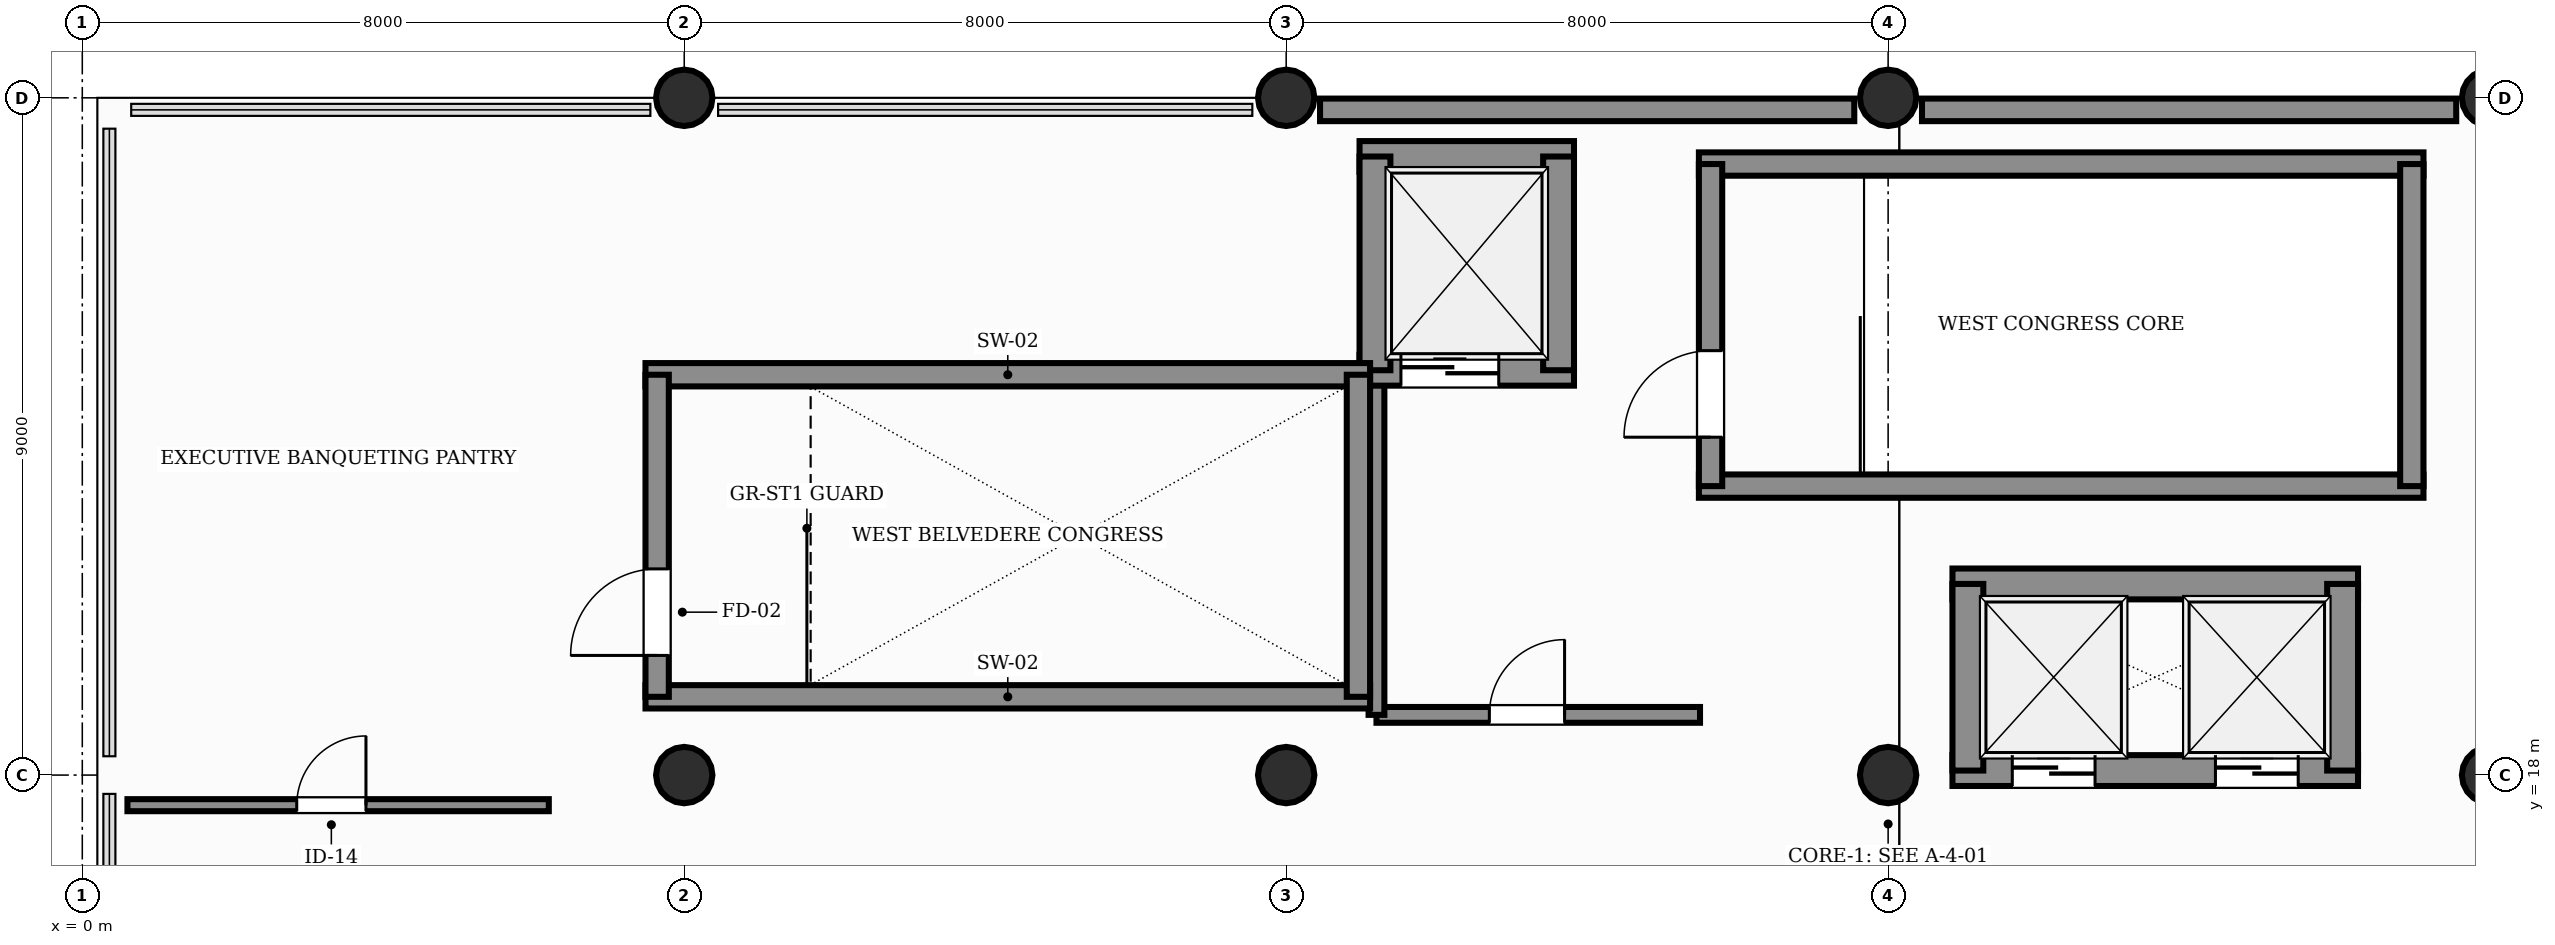
"""IFC4 building model, lengths in metres.
Left out: names, types, materials, properties, quantities, classifications, styles, units other than length and angle.
Written with IfcOpenShell. Run it as: python <this file> out.ifc"""

import sys

from ifc_helpers import new_model, si_unit, direction, frame, frame_2d, origin, origin_2d, place, context, subcontext, project, spatial, rectangle, circle, extrude, element, fill, save


model = new_model("IFC4")
c1 = context("Model", 3, precision=1e-05, world=origin(), true_north=direction((0.0, 1.0)))
c2 = subcontext(c1, "Body", "Model", "MODEL_VIEW")
j1 = project(units=[si_unit("LENGTHUNIT", "METRE"), si_unit("PLANEANGLEUNIT", "RADIAN")], contexts=[c1])
p1 = place(None, origin())
s1 = spatial("IfcSite", under=j1, at=p1, CompositionType="ELEMENT")
p2 = place(p1, origin())
s2 = spatial("IfcBuilding", under=s1, at=p2, CompositionType="ELEMENT")
p3 = place(p2, frame((0.0, 0.0, 21.0)))
s3 = spatial("IfcBuildingStorey", under=s2, at=p3, CompositionType="ELEMENT", Elevation=21.0)
for number, where, z_axis, x_axis in (
    (1, (8.0, 18.0, 0.0), (0.0, 0.0, 1.0), (1.0, 0.0, 0.0)),
    (2, (8.0, 27.0, 0.0), (0.0, 0.0, 1.0), (1.0, 0.0, 0.0)),
    (3, (16.0, 18.0, 0.0), (0.0, 0.0, 1.0), (1.0, 0.0, 0.0)),
    (4, (16.0, 27.0, 0.0), (0.0, 0.0, 1.0), (1.0, 0.0, 0.0)),
    (5, (24.0, 18.0, 0.0), (0.0, 0.0, 1.0), (1.0, 0.0, 0.0)),
    (6, (24.0, 27.0, 0.0), (0.0, 0.0, 1.0), (1.0, 0.0, 0.0)),
    (7, (32.0, 18.0, 0.0), (0.0, 0.0, 1.0), (1.0, 0.0, 0.0)),
    (8, (32.0, 27.0, 0.0), (0.0, 0.0, 1.0), (1.0, 0.0, 0.0)),
):
    element("IfcColumn", number, at=place(p3, frame(where, z_axis=z_axis, x_axis=x_axis)), inside=s3, PredefinedType="COLUMN", context=c2, shape_type="SweptSolid", body=[
        extrude(circle(Radius=0.375, at=origin_2d()), origin(), (0.0, 0.0, 1.0), 4.8),
    ])
for number, where, z_axis, x_axis in (
    (9, (16.45, 26.84, 0.0), (0.0, 0.0, 1.0), (1.0, 0.0, 0.0)),
    (10, (24.45, 26.84, 0.0), (0.0, 0.0, 1.0), (1.0, 0.0, 0.0)),
):
    element("IfcWall", number, at=place(p3, frame(where, z_axis=z_axis, x_axis=x_axis)), inside=s3, PredefinedType="SOLIDWALL", context=c2, shape_type="SweptSolid", body=[
        extrude(rectangle(XDim=7.1, YDim=0.3, at=frame_2d((3.55, 0.0))), origin(), (0.0, 0.0, 1.0), 3.68),
    ])
for number, where, z_axis, x_axis in (
    (11, (21.485, 21.84, 0.0), (0.0, 0.0, 1.0), (1.0, 0.0, 0.0)),
    (12, (21.485, 26.12, 0.0), (0.0, 0.0, 1.0), (1.0, 0.0, 0.0)),
):
    element("IfcWall", number, at=place(p3, frame(where, z_axis=z_axis, x_axis=x_axis)), inside=s3, PredefinedType="SHEAR", context=c2, shape_type="SweptSolid", body=[
        extrude(rectangle(XDim=9.63, YDim=0.31, at=frame_2d((4.815, 0.0))), origin(), (0.0, 0.0, 1.0), 4.8),
    ])
p4 = place(p3, frame((21.64, 21.84, 0.0), z_axis=(0.0, 0.0, 1.0), x_axis=(0.0, 1.0, 0.0)))
e13 = element("IfcWall", 13, at=p4, inside=s3, PredefinedType="SHEAR", context=c2, shape_type="SweptSolid", body=[
    extrude(rectangle(XDim=4.28, YDim=0.31, at=frame_2d((2.14, 0.0))), origin(), (0.0, 0.0, 1.0), 4.8),
])
p5 = place(p4, frame((0.65, 0.0, 0.0)))
e14 = element("IfcOpeningElement", 14, at=p5, cuts=e13, PredefinedType="OPENING", context=c2, shape_type="SweptSolid", body=[
    extrude(rectangle(XDim=1.15, YDim=2.2, at=frame_2d((0.575, 1.1))), frame((0.0, 0.165, 0.0), z_axis=(0.0, -1.0, 0.0), x_axis=(1.0, 0.0, 0.0)), (0.0, 0.0, 1.0), 0.33),
])
p6 = place(p3, frame((30.96, 21.84, 0.0), z_axis=(0.0, 0.0, 1.0), x_axis=(0.0, 1.0, 0.0)))
e15 = element("IfcWall", 15, at=p6, inside=s3, PredefinedType="SHEAR", context=c2, shape_type="SweptSolid", body=[
    extrude(rectangle(XDim=4.28, YDim=0.31, at=frame_2d((2.14, 0.0))), origin(), (0.0, 0.0, 1.0), 4.8),
])
p7 = place(p3, frame((17.2, 18.8, 0.0), z_axis=(0.0, 0.0, 1.0), x_axis=(1.0, 0.0, 0.0)))
e16 = element("IfcWall", 16, at=p7, inside=s3, PredefinedType="PARTITIONING", context=c2, shape_type="SweptSolid", body=[
    extrude(rectangle(XDim=4.3, YDim=0.21, at=frame_2d((2.15, 0.0))), origin(), (0.0, 0.0, 1.0), 3.6),
])
p8 = place(p7, frame((1.5, 0.0, 0.0)))
e17 = element("IfcOpeningElement", 17, at=p8, cuts=e16, PredefinedType="OPENING", context=c2, shape_type="SweptSolid", body=[
    extrude(rectangle(XDim=1.0, YDim=2.15, at=frame_2d((0.5, 1.075))), frame((0.0, 0.115, 0.0), z_axis=(0.0, -1.0, 0.0), x_axis=(1.0, 0.0, 0.0)), (0.0, 0.0, 1.0), 0.23),
])
p9 = place(p3, frame((17.2, 18.8, 0.0), z_axis=(0.0, 0.0, 1.0), x_axis=(0.0, 1.0, 0.0)))
e18 = element("IfcWall", 18, at=p9, inside=s3, PredefinedType="PARTITIONING", context=c2, shape_type="SweptSolid", body=[
    extrude(rectangle(XDim=4.6, YDim=0.21, at=frame_2d((2.3, 0.0))), origin(), (0.0, 0.0, 1.0), 3.6),
])
p10 = place(p3, frame((16.975, 23.38, 0.0), z_axis=(0.0, 0.0, 1.0), x_axis=(1.0, 0.0, 0.0)))
e19 = element("IfcWall", 19, at=p10, inside=s3, PredefinedType="SHEAR", context=c2, shape_type="SweptSolid", body=[
    extrude(rectangle(XDim=2.85, YDim=0.41, at=frame_2d((1.425, 0.0))), origin(), (0.0, 0.0, 1.0), 4.8),
])
p11 = place(p10, frame((0.55, 0.0, 0.0)))
e20 = element("IfcOpeningElement", 20, at=p11, cuts=e19, PredefinedType="OPENING", context=c2, shape_type="SweptSolid", body=[
    extrude(rectangle(XDim=1.3, YDim=2.25, at=frame_2d((0.65, 1.125))), frame((0.0, 0.215, 0.0), z_axis=(0.0, -1.0, 0.0), x_axis=(1.0, 0.0, 0.0)), (0.0, 0.0, 1.0), 0.43),
])
p12 = place(p3, frame((16.975, 26.22, 0.0), z_axis=(0.0, 0.0, 1.0), x_axis=(1.0, 0.0, 0.0)))
e21 = element("IfcWall", 21, at=p12, inside=s3, PredefinedType="SHEAR", context=c2, shape_type="SweptSolid", body=[
    extrude(rectangle(XDim=2.85, YDim=0.41, at=frame_2d((1.425, 0.0))), origin(), (0.0, 0.0, 1.0), 4.8),
])
for number, where, z_axis, x_axis in (
    (22, (17.18, 23.38, 0.0), (0.0, 0.0, 1.0), (0.0, 1.0, 0.0)),
    (23, (19.62, 23.38, 0.0), (0.0, 0.0, 1.0), (0.0, 1.0, 0.0)),
):
    element("IfcWall", number, at=place(p3, frame(where, z_axis=z_axis, x_axis=x_axis)), inside=s3, PredefinedType="SHEAR", context=c2, shape_type="SweptSolid", body=[
        extrude(rectangle(XDim=2.84, YDim=0.41, at=frame_2d((1.42, 0.0))), origin(), (0.0, 0.0, 1.0), 4.8),
    ])
p13 = place(p3, frame((24.855, 18.06, 0.0), z_axis=(0.0, 0.0, 1.0), x_axis=(1.0, 0.0, 0.0)))
e24 = element("IfcWall", 24, at=p13, inside=s3, PredefinedType="SHEAR", context=c2, shape_type="SweptSolid", body=[
    extrude(rectangle(XDim=5.39, YDim=0.41, at=frame_2d((2.695, 0.0))), origin(), (0.0, 0.0, 1.0), 4.8),
])
p14 = place(p13, frame((0.795, 0.0, 0.0)))
e25 = element("IfcOpeningElement", 25, at=p14, cuts=e24, PredefinedType="OPENING", context=c2, shape_type="SweptSolid", body=[
    extrude(rectangle(XDim=1.1, YDim=2.2, at=frame_2d((0.55, 1.1))), frame((0.0, 0.215, 0.0), z_axis=(0.0, -1.0, 0.0), x_axis=(1.0, 0.0, 0.0)), (0.0, 0.0, 1.0), 0.43),
])
p15 = place(p13, frame((3.495, 0.0, 0.0)))
e26 = element("IfcOpeningElement", 26, at=p15, cuts=e24, PredefinedType="OPENING", context=c2, shape_type="SweptSolid", body=[
    extrude(rectangle(XDim=1.1, YDim=2.2, at=frame_2d((0.55, 1.1))), frame((0.0, 0.215, 0.0), z_axis=(0.0, -1.0, 0.0), x_axis=(1.0, 0.0, 0.0)), (0.0, 0.0, 1.0), 0.43),
])
p16 = place(p3, frame((24.855, 20.54, 0.0), z_axis=(0.0, 0.0, 1.0), x_axis=(1.0, 0.0, 0.0)))
e27 = element("IfcWall", 27, at=p16, inside=s3, PredefinedType="SHEAR", context=c2, shape_type="SweptSolid", body=[
    extrude(rectangle(XDim=5.39, YDim=0.41, at=frame_2d((2.695, 0.0))), origin(), (0.0, 0.0, 1.0), 4.8),
])
for number, where, z_axis, x_axis in (
    (28, (25.06, 18.06, 0.0), (0.0, 0.0, 1.0), (0.0, 1.0, 0.0)),
    (29, (30.04, 18.06, 0.0), (0.0, 0.0, 1.0), (0.0, 1.0, 0.0)),
):
    element("IfcWall", number, at=place(p3, frame(where, z_axis=z_axis, x_axis=x_axis)), inside=s3, PredefinedType="SHEAR", context=c2, shape_type="SweptSolid", body=[
        extrude(rectangle(XDim=2.48, YDim=0.41, at=frame_2d((1.24, 0.0))), origin(), (0.0, 0.0, 1.0), 4.8),
    ])
for number, where, z_axis, x_axis in (
    (30, (7.485, 19.04, 0.0), (0.0, 0.0, 1.0), (1.0, 0.0, 0.0)),
    (31, (7.485, 23.32, 0.0), (0.0, 0.0, 1.0), (1.0, 0.0, 0.0)),
):
    element("IfcWall", number, at=place(p3, frame(where, z_axis=z_axis, x_axis=x_axis)), inside=s3, PredefinedType="SHEAR", context=c2, shape_type="SweptSolid", body=[
        extrude(rectangle(XDim=9.63, YDim=0.31, at=frame_2d((4.815, 0.0))), origin(), (0.0, 0.0, 1.0), 4.8),
    ])
p17 = place(p3, frame((7.64, 19.04, 0.0), z_axis=(0.0, 0.0, 1.0), x_axis=(0.0, 1.0, 0.0)))
e32 = element("IfcWall", 32, at=p17, inside=s3, PredefinedType="SHEAR", context=c2, shape_type="SweptSolid", body=[
    extrude(rectangle(XDim=4.28, YDim=0.31, at=frame_2d((2.14, 0.0))), origin(), (0.0, 0.0, 1.0), 4.8),
])
p18 = place(p17, frame((0.55, 0.0, 0.0)))
e33 = element("IfcOpeningElement", 33, at=p18, cuts=e32, PredefinedType="OPENING", context=c2, shape_type="SweptSolid", body=[
    extrude(rectangle(XDim=1.15, YDim=2.2, at=frame_2d((0.575, 1.1))), frame((0.0, 0.165, 0.0), z_axis=(0.0, -1.0, 0.0), x_axis=(1.0, 0.0, 0.0)), (0.0, 0.0, 1.0), 0.33),
])
p19 = place(p3, frame((16.96, 19.04, 0.0), z_axis=(0.0, 0.0, 1.0), x_axis=(0.0, 1.0, 0.0)))
e34 = element("IfcWall", 34, at=p19, inside=s3, PredefinedType="SHEAR", context=c2, shape_type="SweptSolid", body=[
    extrude(rectangle(XDim=4.28, YDim=0.31, at=frame_2d((2.14, 0.0))), origin(), (0.0, 0.0, 1.0), 4.8),
])
p20 = place(p3, frame((0.6, 17.6, 0.0), z_axis=(0.0, 0.0, 1.0), x_axis=(1.0, 0.0, 0.0)))
e35 = element("IfcWall", 35, at=p20, inside=s3, PredefinedType="PARTITIONING", context=c2, shape_type="SweptSolid", body=[
    extrude(rectangle(XDim=5.6, YDim=0.16, at=frame_2d((2.8, 0.0))), origin(), (0.0, 0.0, 1.0), 3.6),
])
p21 = place(p20, frame((2.25, 0.0, 0.0)))
e36 = element("IfcOpeningElement", 36, at=p21, cuts=e35, PredefinedType="OPENING", context=c2, shape_type="SweptSolid", body=[
    extrude(rectangle(XDim=0.92, YDim=2.15, at=frame_2d((0.46, 1.075))), frame((0.0, 0.09, 0.0), z_axis=(0.0, -1.0, 0.0), x_axis=(1.0, 0.0, 0.0)), (0.0, 0.0, 1.0), 0.18),
])
p22 = place(p5, origin())
e37 = element("IfcDoor", 37, at=p22, inside=s3, OperationType="SINGLE_SWING_LEFT", PredefinedType="DOOR", context=c2, shape_type="SweptSolid", body=[
    extrude(rectangle(XDim=1.15, YDim=2.2, at=frame_2d((0.575, 1.1))), frame((0.0, 0.025, 0.0), z_axis=(0.0, -1.0, 0.0), x_axis=(1.0, 0.0, 0.0)), (0.0, 0.0, 1.0), 0.05),
])
fill(e14, e37)
p23 = place(p8, origin())
e38 = element("IfcDoor", 38, at=p23, inside=s3, OperationType="SINGLE_SWING_RIGHT", PredefinedType="DOOR", context=c2, shape_type="SweptSolid", body=[
    extrude(rectangle(XDim=1.0, YDim=2.15, at=frame_2d((0.5, 1.075))), frame((0.0, 0.025, 0.0), z_axis=(0.0, -1.0, 0.0), x_axis=(1.0, 0.0, 0.0)), (0.0, 0.0, 1.0), 0.05),
])
fill(e17, e38)
p24 = place(p11, origin())
e39 = element("IfcDoor", 39, at=p24, inside=s3, OperationType="DOUBLE_DOOR_SLIDING", PredefinedType="DOOR", context=c2, shape_type="SweptSolid", body=[
    extrude(rectangle(XDim=1.3, YDim=2.25, at=frame_2d((0.65, 1.125))), frame((0.0, 0.025, 0.0), z_axis=(0.0, -1.0, 0.0), x_axis=(1.0, 0.0, 0.0)), (0.0, 0.0, 1.0), 0.05),
])
fill(e20, e39)
p25 = place(p14, origin())
e40 = element("IfcDoor", 40, at=p25, inside=s3, OperationType="DOUBLE_DOOR_SLIDING", PredefinedType="DOOR", context=c2, shape_type="SweptSolid", body=[
    extrude(rectangle(XDim=1.1, YDim=2.2, at=frame_2d((0.55, 1.1))), frame((0.0, 0.025, 0.0), z_axis=(0.0, -1.0, 0.0), x_axis=(1.0, 0.0, 0.0)), (0.0, 0.0, 1.0), 0.05),
])
fill(e25, e40)
p26 = place(p15, origin())
e41 = element("IfcDoor", 41, at=p26, inside=s3, OperationType="DOUBLE_DOOR_SLIDING", PredefinedType="DOOR", context=c2, shape_type="SweptSolid", body=[
    extrude(rectangle(XDim=1.1, YDim=2.2, at=frame_2d((0.55, 1.1))), frame((0.0, 0.025, 0.0), z_axis=(0.0, -1.0, 0.0), x_axis=(1.0, 0.0, 0.0)), (0.0, 0.0, 1.0), 0.05),
])
fill(e26, e41)
p27 = place(p18, origin())
e42 = element("IfcDoor", 42, at=p27, inside=s3, OperationType="SINGLE_SWING_LEFT", PredefinedType="DOOR", context=c2, shape_type="SweptSolid", body=[
    extrude(rectangle(XDim=1.15, YDim=2.2, at=frame_2d((0.575, 1.1))), frame((0.0, 0.025, 0.0), z_axis=(0.0, -1.0, 0.0), x_axis=(1.0, 0.0, 0.0)), (0.0, 0.0, 1.0), 0.05),
])
fill(e33, e42)
p28 = place(p21, origin())
e43 = element("IfcDoor", 43, at=p28, inside=s3, OperationType="SINGLE_SWING_RIGHT", PredefinedType="DOOR", context=c2, shape_type="SweptSolid", body=[
    extrude(rectangle(XDim=0.92, YDim=2.15, at=frame_2d((0.46, 1.075))), frame((0.0, 0.025, 0.0), z_axis=(0.0, -1.0, 0.0), x_axis=(1.0, 0.0, 0.0)), (0.0, 0.0, 1.0), 0.05),
])
fill(e36, e43)
save(model, sys.argv[1])
